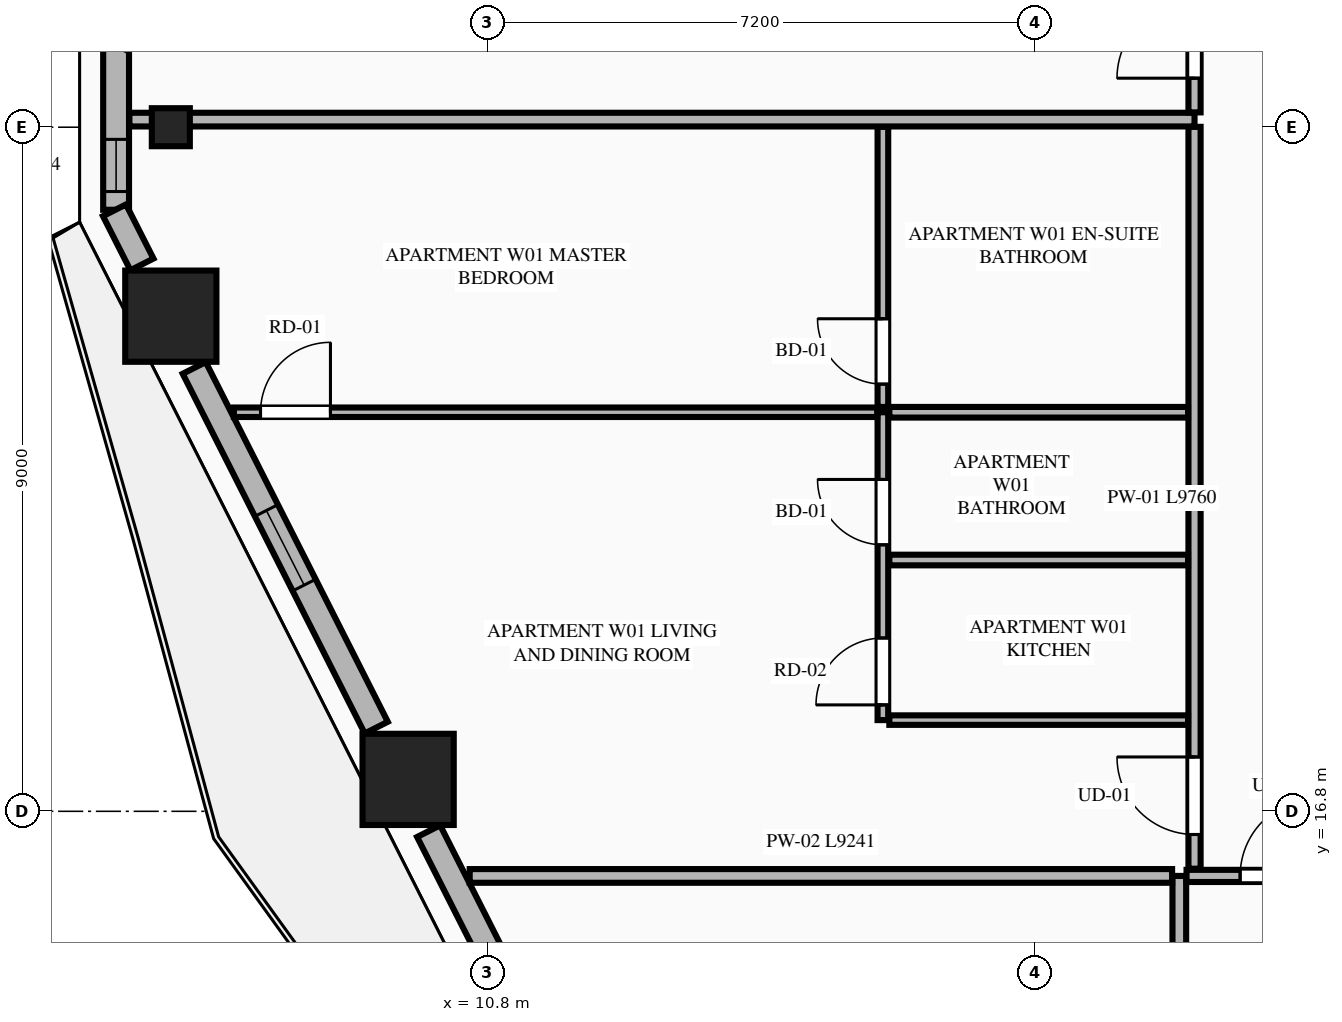
"""IFC4 building model, lengths in metres.
Left out: names, types, materials, properties, quantities, classifications, styles, units other than length and angle.
Written with IfcOpenShell. Run it as: python <this file> out.ifc"""

import sys

from ifc_helpers import new_model, si_unit, direction, frame, frame_2d, origin, origin_2d, place, context, subcontext, project, spatial, rectangle, extrude, element, fill, save


model = new_model("IFC4")
c1 = context("Model", 3, precision=1e-05, world=origin(), true_north=direction((0.0, 1.0)))
c2 = subcontext(c1, "Body", "Model", "MODEL_VIEW")
j1 = project(units=[si_unit("LENGTHUNIT", "METRE"), si_unit("PLANEANGLEUNIT", "RADIAN")], contexts=[c1])
p1 = place(None, origin())
s1 = spatial("IfcSite", under=j1, at=p1, CompositionType="ELEMENT")
p2 = place(p1, origin())
s2 = spatial("IfcBuilding", under=s1, at=p2, CompositionType="ELEMENT")
p3 = place(p2, frame((0.0, 0.0, 35.55)))
s3 = spatial("IfcBuildingStorey", under=s2, at=p3, CompositionType="ELEMENT", Elevation=35.55)
for number, where, z_axis, x_axis in (
    (1, (6.632, 23.314, 0.0), (0.0, 0.0, 1.0), (1.0, 0.0, 0.0)),
    (2, (9.754, 17.22, 0.0), (0.0, 0.0, 1.0), (1.0, 0.0, 0.0)),
):
    element("IfcColumn", number, at=place(p3, frame(where, z_axis=z_axis, x_axis=x_axis)), inside=s3, PredefinedType="COLUMN", context=c2, shape_type="SweptSolid", body=[
        extrude(rectangle(XDim=1.2, YDim=1.2, at=origin_2d()), origin(), (0.0, 0.0, 1.0), 3.55),
    ])
p4 = place(p3, frame((6.632, 25.8, 0.0), z_axis=(0.0, 0.0, 1.0), x_axis=(0.0, -1.0, 0.0)))
e3 = element("IfcColumn", 3, at=p4, inside=s3, PredefinedType="PILASTER", context=c2, shape_type="SweptSolid", body=[
    extrude(rectangle(XDim=0.5, YDim=0.35, at=origin_2d()), origin(), (0.0, 0.0, 1.0), 3.55),
])
p5 = place(p3, frame((5.912, 26.886, 0.0), z_axis=(0.0, 0.0, 1.0), x_axis=(0.0, -1.0, 0.0)))
e4 = element("IfcWall", 4, at=p5, inside=s3, PredefinedType="STANDARD", context=c2, shape_type="SweptSolid", body=[
    extrude(rectangle(XDim=2.172, YDim=0.34, at=frame_2d((1.086, 0.0))), origin(), (0.0, 0.0, 1.0), 3.33),
])
p6 = place(p5, frame((1.246, 0.0, 0.75)))
e5 = element("IfcOpeningElement", 5, at=p6, cuts=e4, PredefinedType="OPENING", context=c2, shape_type="SweptSolid", body=[
    extrude(rectangle(XDim=0.686, YDim=2.0, at=frame_2d((0.343, 1.0))), frame((0.0, 0.18, 0.0), z_axis=(0.0, -1.0, 0.0), x_axis=(1.0, 0.0, 0.0)), (0.0, 0.0, 1.0), 0.36),
])
p7 = place(p3, frame((5.891, 24.707, 0.0), z_axis=(0.0, 0.0, 1.0), x_axis=(0.452101093511, -0.891966704113, 0.0)))
e6 = element("IfcWall", 6, at=p7, inside=s3, PredefinedType="STANDARD", context=c2, shape_type="SweptSolid", body=[
    extrude(rectangle(XDim=0.798, YDim=0.34, at=frame_2d((0.399, 0.0))), origin(), (0.0, 0.0, 1.0), 3.33),
])
p8 = place(p3, frame((6.94, 22.633, 0.0), z_axis=(0.0, 0.0, 1.0), x_axis=(0.451572088722, -0.892234637686, 0.0)))
e7 = element("IfcWall", 7, at=p8, inside=s3, PredefinedType="STANDARD", context=c2, shape_type="SweptSolid", body=[
    extrude(rectangle(XDim=5.304, YDim=0.34, at=frame_2d((2.652, 0.0))), origin(), (0.0, 0.0, 1.0), 2.787),
])
p9 = place(p8, frame((2.102, 0.0, 0.75)))
e8 = element("IfcOpeningElement", 8, at=p9, cuts=e7, PredefinedType="OPENING", context=c2, shape_type="SweptSolid", body=[
    extrude(rectangle(XDim=1.1, YDim=1.887, at=frame_2d((0.55, 0.943))), frame((0.0, 0.18, 0.0), z_axis=(0.0, -1.0, 0.0), x_axis=(1.0, 0.0, 0.0)), (0.0, 0.0, 1.0), 0.36),
])
p10 = place(p3, frame((10.024, 16.539, 0.0), z_axis=(0.0, 0.0, 1.0), x_axis=(0.451627137896, -0.892206774417, 0.0)))
e9 = element("IfcWall", 9, at=p10, inside=s3, PredefinedType="STANDARD", context=c2, shape_type="SweptSolid", body=[
    extrude(rectangle(XDim=5.547, YDim=0.34, at=frame_2d((2.773, 0.0))), origin(), (0.0, 0.0, 1.0), 2.787),
])
p11 = place(p10, frame((2.679, 0.0, 0.0)))
e10 = element("IfcOpeningElement", 10, at=p11, cuts=e9, PredefinedType="OPENING", context=c2, shape_type="SweptSolid", body=[
    extrude(rectangle(XDim=1.1, YDim=2.25, at=frame_2d((0.55, 1.125))), frame((0.0, 0.18, 0.0), z_axis=(0.0, -1.0, 0.0), x_axis=(1.0, 0.0, 0.0)), (0.0, 0.0, 1.0), 0.36),
])
p12 = place(p3, frame((19.9, 2.455, 0.0), z_axis=(0.0, 0.0, 1.0), x_axis=(0.0, 1.0, 0.0)))
e11 = element("IfcWall", 11, at=p12, inside=s3, PredefinedType="PARTITIONING", context=c2, shape_type="SweptSolid", body=[
    extrude(rectangle(XDim=13.495, YDim=0.18, at=frame_2d((6.748, 0.0))), origin(), (0.0, 0.0, 1.0), 3.33),
])
p13 = place(p3, frame((19.995, 15.95, 0.0), z_axis=(0.0, 0.0, 1.0), x_axis=(1.0, 0.0, 0.0)))
e12 = element("IfcWall", 12, at=p13, inside=s3, PredefinedType="PARTITIONING", context=c2, shape_type="SweptSolid", body=[
    extrude(rectangle(XDim=8.188, YDim=0.16, at=frame_2d((4.094, 0.0))), origin(), (0.0, 0.0, 1.0), 3.33),
])
p14 = place(p13, frame((0.705, 0.0, 0.0)))
e13 = element("IfcOpeningElement", 13, at=p14, cuts=e12, PredefinedType="OPENING", context=c2, shape_type="SweptSolid", body=[
    extrude(rectangle(XDim=1.02, YDim=2.25, at=frame_2d((0.51, 1.125))), frame((0.0, 0.09, 0.0), z_axis=(0.0, -1.0, 0.0), x_axis=(1.0, 0.0, 0.0)), (0.0, 0.0, 1.0), 0.18),
])
p15 = place(p3, frame((10.564, 15.95, 0.0), z_axis=(0.0, 0.0, 1.0), x_axis=(1.0, 0.0, 0.0)))
e14 = element("IfcWall", 14, at=p15, inside=s3, PredefinedType="PARTITIONING", context=c2, shape_type="SweptSolid", body=[
    extrude(rectangle(XDim=9.241, YDim=0.18, at=frame_2d((4.621, 0.0))), origin(), (0.0, 0.0, 1.0), 3.33),
])
p16 = place(p3, frame((20.1, 16.045, 0.0), z_axis=(0.0, 0.0, 1.0), x_axis=(0.0, 1.0, 0.0)))
e15 = element("IfcWall", 15, at=p16, inside=s3, PredefinedType="PARTITIONING", context=c2, shape_type="SweptSolid", body=[
    extrude(rectangle(XDim=9.76, YDim=0.16, at=frame_2d((4.88, 0.0))), origin(), (0.0, 0.0, 1.0), 2.7),
])
p17 = place(p16, frame((0.45, 0.0, 0.0)))
e16 = element("IfcOpeningElement", 16, at=p17, cuts=e15, PredefinedType="OPENING", context=c2, shape_type="SweptSolid", body=[
    extrude(rectangle(XDim=1.02, YDim=2.25, at=frame_2d((0.51, 1.125))), frame((0.0, 0.09, 0.0), z_axis=(0.0, -1.0, 0.0), x_axis=(1.0, 0.0, 0.0)), (0.0, 0.0, 1.0), 0.18),
])
p18 = place(p3, frame((16.085, 18.0, 0.0), z_axis=(0.0, 0.0, 1.0), x_axis=(1.0, 0.0, 0.0)))
e17 = element("IfcWall", 17, at=p18, inside=s3, PredefinedType="PARTITIONING", context=c2, shape_type="SweptSolid", body=[
    extrude(rectangle(XDim=3.93, YDim=0.125, at=frame_2d((1.965, 0.0))), origin(), (0.0, 0.0, 1.0), 2.7),
])
p19 = place(p3, frame((16.0, 18.0, 0.0), z_axis=(0.0, 0.0, 1.0), x_axis=(0.0, 1.0, 0.0)))
e18 = element("IfcWall", 18, at=p19, inside=s3, PredefinedType="PLUMBINGWALL", context=c2, shape_type="SweptSolid", body=[
    extrude(rectangle(XDim=4.05, YDim=0.14, at=frame_2d((2.025, 0.0))), origin(), (0.0, 0.0, 1.0), 3.33),
])
p20 = place(p19, frame((0.2, 0.0, 0.0)))
e19 = element("IfcOpeningElement", 19, at=p20, cuts=e18, PredefinedType="OPENING", context=c2, shape_type="SweptSolid", body=[
    extrude(rectangle(XDim=0.88, YDim=2.15, at=frame_2d((0.44, 1.075))), frame((0.0, 0.08, 0.0), z_axis=(0.0, -1.0, 0.0), x_axis=(1.0, 0.0, 0.0)), (0.0, 0.0, 1.0), 0.16),
])
p21 = place(p19, frame((2.306, 0.0, 0.0)))
e20 = element("IfcOpeningElement", 20, at=p21, cuts=e18, PredefinedType="OPENING", context=c2, shape_type="SweptSolid", body=[
    extrude(rectangle(XDim=0.86, YDim=2.1, at=frame_2d((0.43, 1.05))), frame((0.0, 0.08, 0.0), z_axis=(0.0, -1.0, 0.0), x_axis=(1.0, 0.0, 0.0)), (0.0, 0.0, 1.0), 0.16),
])
p22 = place(p3, frame((16.0, 22.12, 0.0), z_axis=(0.0, 0.0, 1.0), x_axis=(0.0, 1.0, 0.0)))
e21 = element("IfcWall", 21, at=p22, inside=s3, PredefinedType="PLUMBINGWALL", context=c2, shape_type="SweptSolid", body=[
    extrude(rectangle(XDim=3.685, YDim=0.14, at=frame_2d((1.842, 0.0))), origin(), (0.0, 0.0, 1.0), 3.33),
])
p23 = place(p22, frame((0.3, 0.0, 0.0)))
e22 = element("IfcOpeningElement", 22, at=p23, cuts=e21, PredefinedType="OPENING", context=c2, shape_type="SweptSolid", body=[
    extrude(rectangle(XDim=0.86, YDim=2.1, at=frame_2d((0.43, 1.05))), frame((0.0, 0.08, 0.0), z_axis=(0.0, -1.0, 0.0), x_axis=(1.0, 0.0, 0.0)), (0.0, 0.0, 1.0), 0.16),
])
p24 = place(p3, frame((16.085, 22.05, 0.0), z_axis=(0.0, 0.0, 1.0), x_axis=(1.0, 0.0, 0.0)))
e23 = element("IfcWall", 23, at=p24, inside=s3, PredefinedType="PLUMBINGWALL", context=c2, shape_type="SweptSolid", body=[
    extrude(rectangle(XDim=3.93, YDim=0.14, at=frame_2d((1.965, 0.0))), origin(), (0.0, 0.0, 1.0), 3.33),
])
p25 = place(p3, frame((7.462, 22.05, 0.0), z_axis=(0.0, 0.0, 1.0), x_axis=(1.0, 0.0, 0.0)))
e24 = element("IfcWall", 24, at=p25, inside=s3, PredefinedType="PARTITIONING", context=c2, shape_type="SweptSolid", body=[
    extrude(rectangle(XDim=8.463, YDim=0.125, at=frame_2d((4.231, 0.0))), origin(), (0.0, 0.0, 1.0), 3.33),
])
p26 = place(p25, frame((0.35, 0.0, 0.0)))
e25 = element("IfcOpeningElement", 25, at=p26, cuts=e24, PredefinedType="OPENING", context=c2, shape_type="SweptSolid", body=[
    extrude(rectangle(XDim=0.92, YDim=2.15, at=frame_2d((0.46, 1.075))), frame((0.0, 0.073, 0.0), z_axis=(0.0, -1.0, 0.0), x_axis=(1.0, 0.0, 0.0)), (0.0, 0.0, 1.0), 0.145),
])
p27 = place(p3, frame((16.085, 20.106, 0.0), z_axis=(0.0, 0.0, 1.0), x_axis=(1.0, 0.0, 0.0)))
e26 = element("IfcWall", 26, at=p27, inside=s3, PredefinedType="PLUMBINGWALL", context=c2, shape_type="SweptSolid", body=[
    extrude(rectangle(XDim=3.93, YDim=0.14, at=frame_2d((1.965, 0.0))), origin(), (0.0, 0.0, 1.0), 3.33),
])
p28 = place(p3, frame((6.087, 25.9, 0.0), z_axis=(0.0, 0.0, 1.0), x_axis=(1.0, 0.0, 0.0)))
e27 = element("IfcWall", 27, at=p28, inside=s3, PredefinedType="PARTITIONING", context=c2, shape_type="SweptSolid", body=[
    extrude(rectangle(XDim=14.013, YDim=0.18, at=frame_2d((7.007, 0.0))), origin(), (0.0, 0.0, 1.0), 3.33),
])
p29 = place(p3, frame((20.1, 25.995, 0.0), z_axis=(0.0, 0.0, 1.0), x_axis=(0.0, 1.0, 0.0)))
e28 = element("IfcWall", 28, at=p29, inside=s3, PredefinedType="PARTITIONING", context=c2, shape_type="SweptSolid", body=[
    extrude(rectangle(XDim=9.76, YDim=0.16, at=frame_2d((4.88, 0.0))), origin(), (0.0, 0.0, 1.0), 2.7),
])
p30 = place(p29, frame((0.45, 0.0, 0.0)))
e29 = element("IfcOpeningElement", 29, at=p30, cuts=e28, PredefinedType="OPENING", context=c2, shape_type="SweptSolid", body=[
    extrude(rectangle(XDim=1.02, YDim=2.25, at=frame_2d((0.51, 1.125))), frame((0.0, 0.09, 0.0), z_axis=(0.0, -1.0, 0.0), x_axis=(1.0, 0.0, 0.0)), (0.0, 0.0, 1.0), 0.18),
])
p31 = place(p9, origin())
e30 = element("IfcWindow", 30, at=p31, inside=s3, PartitioningType="SINGLE_PANEL", PredefinedType="WINDOW", context=c2, shape_type="SweptSolid", body=[
    extrude(rectangle(XDim=1.1, YDim=1.887, at=frame_2d((0.55, 0.943))), frame((0.0, 0.03, 0.0), z_axis=(0.0, -1.0, 0.0), x_axis=(1.0, 0.0, 0.0)), (0.0, 0.0, 1.0), 0.06),
])
fill(e8, e30)
p32 = place(p14, origin())
e31 = element("IfcDoor", 31, at=p32, inside=s3, OperationType="SINGLE_SWING_RIGHT", PredefinedType="DOOR", context=c2, shape_type="SweptSolid", body=[
    extrude(rectangle(XDim=1.02, YDim=2.25, at=frame_2d((0.51, 1.125))), frame((0.0, 0.025, 0.0), z_axis=(0.0, -1.0, 0.0), x_axis=(1.0, 0.0, 0.0)), (0.0, 0.0, 1.0), 0.05),
])
fill(e13, e31)
p33 = place(p20, origin())
e32 = element("IfcDoor", 32, at=p33, inside=s3, OperationType="SINGLE_SWING_LEFT", PredefinedType="DOOR", context=c2, shape_type="SweptSolid", body=[
    extrude(rectangle(XDim=0.88, YDim=2.15, at=frame_2d((0.44, 1.075))), frame((0.0, 0.025, 0.0), z_axis=(0.0, -1.0, 0.0), x_axis=(1.0, 0.0, 0.0)), (0.0, 0.0, 1.0), 0.05),
])
fill(e19, e32)
p34 = place(p21, origin())
e33 = element("IfcDoor", 33, at=p34, inside=s3, OperationType="SINGLE_SWING_RIGHT", PredefinedType="DOOR", context=c2, shape_type="SweptSolid", body=[
    extrude(rectangle(XDim=0.86, YDim=2.1, at=frame_2d((0.43, 1.05))), frame((0.0, 0.025, 0.0), z_axis=(0.0, -1.0, 0.0), x_axis=(1.0, 0.0, 0.0)), (0.0, 0.0, 1.0), 0.05),
])
fill(e20, e33)
p35 = place(p23, origin())
e34 = element("IfcDoor", 34, at=p35, inside=s3, OperationType="SINGLE_SWING_RIGHT", PredefinedType="DOOR", context=c2, shape_type="SweptSolid", body=[
    extrude(rectangle(XDim=0.86, YDim=2.1, at=frame_2d((0.43, 1.05))), frame((0.0, 0.025, 0.0), z_axis=(0.0, -1.0, 0.0), x_axis=(1.0, 0.0, 0.0)), (0.0, 0.0, 1.0), 0.05),
])
fill(e22, e34)
p36 = place(p17, origin())
e35 = element("IfcDoor", 35, at=p36, inside=s3, OperationType="SINGLE_SWING_RIGHT", PredefinedType="DOOR", context=c2, shape_type="SweptSolid", body=[
    extrude(rectangle(XDim=1.02, YDim=2.25, at=frame_2d((0.51, 1.125))), frame((0.0, 0.025, 0.0), z_axis=(0.0, -1.0, 0.0), x_axis=(1.0, 0.0, 0.0)), (0.0, 0.0, 1.0), 0.05),
])
fill(e16, e35)
p37 = place(p26, origin())
e36 = element("IfcDoor", 36, at=p37, inside=s3, OperationType="SINGLE_SWING_RIGHT", PredefinedType="DOOR", context=c2, shape_type="SweptSolid", body=[
    extrude(rectangle(XDim=0.92, YDim=2.15, at=frame_2d((0.46, 1.075))), frame((0.0, 0.025, 0.0), z_axis=(0.0, -1.0, 0.0), x_axis=(1.0, 0.0, 0.0)), (0.0, 0.0, 1.0), 0.05),
])
fill(e25, e36)
p38 = place(p30, origin())
e37 = element("IfcDoor", 37, at=p38, inside=s3, OperationType="SINGLE_SWING_LEFT", PredefinedType="DOOR", context=c2, shape_type="SweptSolid", body=[
    extrude(rectangle(XDim=1.02, YDim=2.25, at=frame_2d((0.51, 1.125))), frame((0.0, 0.025, 0.0), z_axis=(0.0, -1.0, 0.0), x_axis=(1.0, 0.0, 0.0)), (0.0, 0.0, 1.0), 0.05),
])
fill(e29, e37)
p39 = place(p6, origin())
e38 = element("IfcWindow", 38, at=p39, inside=s3, PartitioningType="SINGLE_PANEL", PredefinedType="WINDOW", context=c2, shape_type="SweptSolid", body=[
    extrude(rectangle(XDim=0.686, YDim=2.0, at=frame_2d((0.343, 1.0))), frame((0.0, 0.03, 0.0), z_axis=(0.0, -1.0, 0.0), x_axis=(1.0, 0.0, 0.0)), (0.0, 0.0, 1.0), 0.06),
])
fill(e5, e38)
save(model, sys.argv[1])
